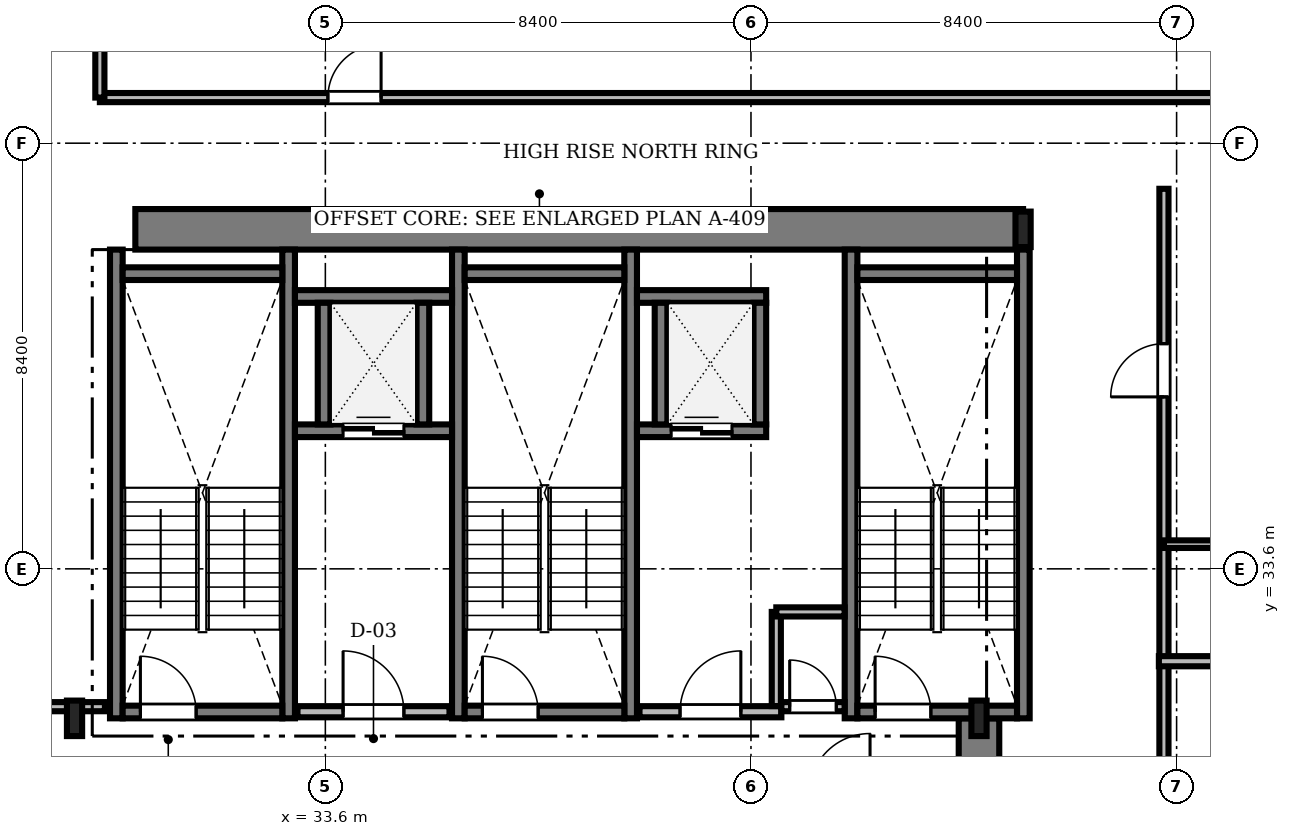
"""IFC4 building model, lengths in metres.
Left out: names, types, materials, properties, quantities, classifications, styles, units other than length and angle.
Written with IfcOpenShell. Run it as: python <this file> out.ifc"""

import sys

from ifc_helpers import new_model, si_unit, direction, frame, frame_2d, origin, origin_2d, place, context, subcontext, project, spatial, rectangle, i_section, extrude, source, transform, mapped, element, fill, save


model = new_model("IFC4")
c1 = context("Model", 3, precision=1e-05, world=origin(), true_north=direction((0.0, 1.0)))
c2 = subcontext(c1, "Body", "Model", "MODEL_VIEW")
j1 = project(units=[si_unit("LENGTHUNIT", "METRE"), si_unit("PLANEANGLEUNIT", "RADIAN")], contexts=[c1])
p1 = place(None, origin())
s1 = spatial("IfcSite", under=j1, at=p1, CompositionType="ELEMENT")
p2 = place(p1, origin())
s2 = spatial("IfcBuilding", under=s1, at=p2, CompositionType="ELEMENT")
p3 = place(p2, frame((0.0, 0.0, 218.55)))
s3 = spatial("IfcBuildingStorey", under=s2, at=p3, CompositionType="ELEMENT", Elevation=218.55)
m1 = source(origin(), c2, "Body", "SweptSolid", [
    extrude(rectangle(XDim=17.52, YDim=0.8, at=frame_2d((8.76, 0.0))), origin(), (0.0, 0.0, 1.0), 3.53),
])
p4 = place(p3, frame((29.85, 40.3, 0.0), z_axis=(0.0, 0.0, 1.0), x_axis=(1.0, 0.0, 0.0)))
e1 = element("IfcWall", 1, at=p4, inside=s3, PredefinedType="SHEAR", context=c2, shape_type="MappedRepresentation", body=[
    mapped(m1, transform((0.0, 0.0, 0.0), scale=1.0)),
])
m2 = source(origin(), c2, "Body", "SweptSolid", [
    extrude(rectangle(XDim=13.15, YDim=0.8, at=frame_2d((6.575, 0.0))), origin(), (0.0, 0.0, 1.0), 3.53),
])
p5 = place(p3, frame((46.5, 17.5, 0.0), z_axis=(0.0, 0.0, 1.0), x_axis=(0.0, 1.0, 0.0)))
e2 = element("IfcWall", 2, at=p5, inside=s3, PredefinedType="SHEAR", context=c2, shape_type="MappedRepresentation", body=[
    mapped(m2, transform((0.0, 0.0, 0.0), scale=1.0)),
])
m3 = source(origin(), c2, "Body", "SweptSolid", [
    extrude(i_section(OverallWidth=0.3, OverallDepth=0.7, WebThickness=0.017, FlangeThickness=0.032, FilletRadius=0.027, at=origin_2d()), origin(), (0.0, 0.0, 1.0), 3.53),
])
for number, where, z_axis, x_axis in (
    (3, (28.65, 30.65, 0.0), (0.0, 0.0, 1.0), (1.0, 0.0, 0.0)),
    (4, (46.5, 30.65, 0.0), (0.0, 0.0, 1.0), (1.0, 0.0, 0.0)),
    (5, (47.37, 40.3, 0.0), (0.0, 0.0, 1.0), (1.0, 0.0, 0.0)),
):
    element("IfcColumn", number, at=place(p3, frame(where, z_axis=z_axis, x_axis=x_axis)), inside=s3, PredefinedType="COLUMN", context=c2, shape_type="MappedRepresentation", body=[
        mapped(m3, transform((0.0, 0.0, 0.0), scale=1.0)),
    ])
m4 = source(origin(), c2, "Body", "SweptSolid", [
    extrude(rectangle(XDim=9.25, YDim=0.25, at=frame_2d((4.625, 0.0))), origin(), (0.0, 0.0, 1.0), 3.55),
])
for number, where, z_axis, x_axis in (
    (6, (29.475, 30.65, 0.0), (0.0, 0.0, 1.0), (0.0, 1.0, 0.0)),
    (7, (32.875, 30.65, 0.0), (0.0, 0.0, 1.0), (0.0, 1.0, 0.0)),
):
    element("IfcWall", number, at=place(p3, frame(where, z_axis=z_axis, x_axis=x_axis)), inside=s3, PredefinedType="SOLIDWALL", context=c2, shape_type="MappedRepresentation", body=[
        mapped(m4, transform((0.0, 0.0, 0.0), scale=1.0)),
    ])
m5 = source(origin(), c2, "Body", "SweptSolid", [
    extrude(rectangle(XDim=3.15, YDim=0.25, at=frame_2d((1.575, 0.0))), origin(), (0.0, 0.0, 1.0), 3.55),
])
p6 = place(p3, frame((29.6, 39.425, 0.0), z_axis=(0.0, 0.0, 1.0), x_axis=(1.0, 0.0, 0.0)))
e8 = element("IfcWall", 8, at=p6, inside=s3, PredefinedType="SOLIDWALL", context=c2, shape_type="MappedRepresentation", body=[
    mapped(m5, transform((0.0, 0.0, 0.0), scale=1.0)),
])
p7 = place(p3, frame((29.6, 30.775, 0.0), z_axis=(0.0, 0.0, 1.0), x_axis=(1.0, 0.0, 0.0)))
e9 = element("IfcWall", 9, at=p7, inside=s3, PredefinedType="SOLIDWALL", context=c2, shape_type="MappedRepresentation", body=[
    mapped(m5, transform((0.0, 0.0, 0.0), scale=1.0)),
])
m6 = source(origin(), c2, "Body", "SweptSolid", [
    extrude(rectangle(XDim=1.1, YDim=2.2, at=frame_2d((0.55, 1.1))), frame((0.0, 0.135, 0.0), z_axis=(0.0, -1.0, 0.0), x_axis=(1.0, 0.0, 0.0)), (0.0, 0.0, 1.0), 0.27),
])
p8 = place(p7, frame((0.35, 0.0, 0.0)))
e10 = element("IfcOpeningElement", 10, at=p8, cuts=e9, PredefinedType="OPENING", context=c2, shape_type="MappedRepresentation", body=[
    mapped(m6, transform((0.0, 0.0, 0.0), scale=1.0)),
])
for number, where, z_axis, x_axis in (
    (11, (36.225, 30.65, 0.0), (0.0, 0.0, 1.0), (0.0, 1.0, 0.0)),
    (12, (39.625, 30.65, 0.0), (0.0, 0.0, 1.0), (0.0, 1.0, 0.0)),
):
    element("IfcWall", number, at=place(p3, frame(where, z_axis=z_axis, x_axis=x_axis)), inside=s3, PredefinedType="SOLIDWALL", context=c2, shape_type="MappedRepresentation", body=[
        mapped(m4, transform((0.0, 0.0, 0.0), scale=1.0)),
    ])
p9 = place(p3, frame((36.35, 39.425, 0.0), z_axis=(0.0, 0.0, 1.0), x_axis=(1.0, 0.0, 0.0)))
e13 = element("IfcWall", 13, at=p9, inside=s3, PredefinedType="SOLIDWALL", context=c2, shape_type="MappedRepresentation", body=[
    mapped(m5, transform((0.0, 0.0, 0.0), scale=1.0)),
])
p10 = place(p3, frame((36.35, 30.775, 0.0), z_axis=(0.0, 0.0, 1.0), x_axis=(1.0, 0.0, 0.0)))
e14 = element("IfcWall", 14, at=p10, inside=s3, PredefinedType="SOLIDWALL", context=c2, shape_type="MappedRepresentation", body=[
    mapped(m5, transform((0.0, 0.0, 0.0), scale=1.0)),
])
p11 = place(p10, frame((0.35, 0.0, 0.0)))
e15 = element("IfcOpeningElement", 15, at=p11, cuts=e14, PredefinedType="OPENING", context=c2, shape_type="MappedRepresentation", body=[
    mapped(m6, transform((0.0, 0.0, 0.0), scale=1.0)),
])
for number, where, z_axis, x_axis in (
    (16, (43.975, 30.65, 0.0), (0.0, 0.0, 1.0), (0.0, 1.0, 0.0)),
    (17, (47.375, 30.65, 0.0), (0.0, 0.0, 1.0), (0.0, 1.0, 0.0)),
):
    element("IfcWall", number, at=place(p3, frame(where, z_axis=z_axis, x_axis=x_axis)), inside=s3, PredefinedType="SOLIDWALL", context=c2, shape_type="MappedRepresentation", body=[
        mapped(m4, transform((0.0, 0.0, 0.0), scale=1.0)),
    ])
p12 = place(p3, frame((44.1, 39.425, 0.0), z_axis=(0.0, 0.0, 1.0), x_axis=(1.0, 0.0, 0.0)))
e18 = element("IfcWall", 18, at=p12, inside=s3, PredefinedType="SOLIDWALL", context=c2, shape_type="MappedRepresentation", body=[
    mapped(m5, transform((0.0, 0.0, 0.0), scale=1.0)),
])
p13 = place(p3, frame((44.1, 30.775, 0.0), z_axis=(0.0, 0.0, 1.0), x_axis=(1.0, 0.0, 0.0)))
e19 = element("IfcWall", 19, at=p13, inside=s3, PredefinedType="SOLIDWALL", context=c2, shape_type="MappedRepresentation", body=[
    mapped(m5, transform((0.0, 0.0, 0.0), scale=1.0)),
])
p14 = place(p13, frame((0.35, 0.0, 0.0)))
e20 = element("IfcOpeningElement", 20, at=p14, cuts=e19, PredefinedType="OPENING", context=c2, shape_type="MappedRepresentation", body=[
    mapped(m6, transform((0.0, 0.0, 0.0), scale=1.0)),
])
m7 = source(origin(), c2, "Body", "SweptSolid", [
    extrude(rectangle(XDim=3.0, YDim=0.22, at=frame_2d((1.5, 0.0))), origin(), (0.0, 0.0, 1.0), 3.53),
])
p15 = place(p3, frame((33.05, 30.78, 0.0), z_axis=(0.0, 0.0, 1.0), x_axis=(1.0, 0.0, 0.0)))
e21 = element("IfcWall", 21, at=p15, inside=s3, PredefinedType="SOLIDWALL", context=c2, shape_type="MappedRepresentation", body=[
    mapped(m7, transform((0.0, 0.0, 0.0), scale=1.0)),
])
m8 = source(origin(), c2, "Body", "SweptSolid", [
    extrude(rectangle(XDim=1.2, YDim=2.2, at=frame_2d((0.6, 1.1))), frame((0.0, 0.12, 0.0), z_axis=(0.0, -1.0, 0.0), x_axis=(1.0, 0.0, 0.0)), (0.0, 0.0, 1.0), 0.24),
])
p16 = place(p15, frame((0.9, 0.0, 0.0)))
e22 = element("IfcOpeningElement", 22, at=p16, cuts=e21, PredefinedType="OPENING", context=c2, shape_type="MappedRepresentation", body=[
    mapped(m8, transform((0.0, 0.0, 0.0), scale=1.0)),
])
m9 = source(origin(), c2, "Body", "SweptSolid", [
    extrude(rectangle(XDim=2.8, YDim=0.22, at=frame_2d((1.4, 0.0))), origin(), (0.0, 0.0, 1.0), 3.53),
])
p17 = place(p3, frame((39.8, 30.78, 0.0), z_axis=(0.0, 0.0, 1.0), x_axis=(1.0, 0.0, 0.0)))
e23 = element("IfcWall", 23, at=p17, inside=s3, PredefinedType="SOLIDWALL", context=c2, shape_type="MappedRepresentation", body=[
    mapped(m9, transform((0.0, 0.0, 0.0), scale=1.0)),
])
p18 = place(p17, frame((0.8, 0.0, 0.0)))
e24 = element("IfcOpeningElement", 24, at=p18, cuts=e23, PredefinedType="OPENING", context=c2, shape_type="MappedRepresentation", body=[
    mapped(m8, transform((0.0, 0.0, 0.0), scale=1.0)),
])
m10 = source(origin(), c2, "Body", "SweptSolid", [
    extrude(rectangle(XDim=3.1, YDim=0.25, at=frame_2d((1.55, 0.0))), origin(), (0.0, 0.0, 1.0), 3.53),
])
p19 = place(p3, frame((33.0, 36.325, 0.0), z_axis=(0.0, 0.0, 1.0), x_axis=(1.0, 0.0, 0.0)))
e25 = element("IfcWall", 25, at=p19, inside=s3, PredefinedType="SOLIDWALL", context=c2, shape_type="MappedRepresentation", body=[
    mapped(m10, transform((0.0, 0.0, 0.0), scale=1.0)),
])
m11 = source(origin(), c2, "Body", "SweptSolid", [
    extrude(rectangle(XDim=1.2, YDim=2.25, at=frame_2d((0.6, 1.125))), frame((0.0, 0.135, 0.0), z_axis=(0.0, -1.0, 0.0), x_axis=(1.0, 0.0, 0.0)), (0.0, 0.0, 1.0), 0.27),
])
p20 = place(p19, frame((0.95, 0.0, 0.0)))
e26 = element("IfcOpeningElement", 26, at=p20, cuts=e25, PredefinedType="OPENING", context=c2, shape_type="MappedRepresentation", body=[
    mapped(m11, transform((0.0, 0.0, 0.0), scale=1.0)),
])
p21 = place(p3, frame((33.0, 38.975, 0.0), z_axis=(0.0, 0.0, 1.0), x_axis=(1.0, 0.0, 0.0)))
e27 = element("IfcWall", 27, at=p21, inside=s3, PredefinedType="SOLIDWALL", context=c2, shape_type="MappedRepresentation", body=[
    mapped(m10, transform((0.0, 0.0, 0.0), scale=1.0)),
])
m12 = source(origin(), c2, "Body", "SweptSolid", [
    extrude(rectangle(XDim=2.4, YDim=0.25, at=frame_2d((1.2, 0.0))), origin(), (0.0, 0.0, 1.0), 3.53),
])
for number, where, z_axis, x_axis in (
    (28, (33.575, 36.45, 0.0), (0.0, 0.0, 1.0), (0.0, 1.0, 0.0)),
    (29, (35.525, 36.45, 0.0), (0.0, 0.0, 1.0), (0.0, 1.0, 0.0)),
):
    element("IfcWall", number, at=place(p3, frame(where, z_axis=z_axis, x_axis=x_axis)), inside=s3, PredefinedType="SOLIDWALL", context=c2, shape_type="MappedRepresentation", body=[
        mapped(m12, transform((0.0, 0.0, 0.0), scale=1.0)),
    ])
m13 = source(origin(), c2, "Body", "SweptSolid", [
    extrude(rectangle(XDim=2.55, YDim=0.25, at=frame_2d((1.275, 0.0))), origin(), (0.0, 0.0, 1.0), 3.53),
])
p22 = place(p3, frame((39.75, 36.325, 0.0), z_axis=(0.0, 0.0, 1.0), x_axis=(1.0, 0.0, 0.0)))
e30 = element("IfcWall", 30, at=p22, inside=s3, PredefinedType="SOLIDWALL", context=c2, shape_type="MappedRepresentation", body=[
    mapped(m13, transform((0.0, 0.0, 0.0), scale=1.0)),
])
p23 = place(p22, frame((0.675, 0.0, 0.0)))
e31 = element("IfcOpeningElement", 31, at=p23, cuts=e30, PredefinedType="OPENING", context=c2, shape_type="MappedRepresentation", body=[
    mapped(m11, transform((0.0, 0.0, 0.0), scale=1.0)),
])
p24 = place(p3, frame((39.75, 38.975, 0.0), z_axis=(0.0, 0.0, 1.0), x_axis=(1.0, 0.0, 0.0)))
e32 = element("IfcWall", 32, at=p24, inside=s3, PredefinedType="SOLIDWALL", context=c2, shape_type="MappedRepresentation", body=[
    mapped(m13, transform((0.0, 0.0, 0.0), scale=1.0)),
])
for number, where, z_axis, x_axis in (
    (33, (40.225, 36.45, 0.0), (0.0, 0.0, 1.0), (0.0, 1.0, 0.0)),
    (34, (42.175, 36.45, 0.0), (0.0, 0.0, 1.0), (0.0, 1.0, 0.0)),
):
    element("IfcWall", number, at=place(p3, frame(where, z_axis=z_axis, x_axis=x_axis)), inside=s3, PredefinedType="SOLIDWALL", context=c2, shape_type="MappedRepresentation", body=[
        mapped(m12, transform((0.0, 0.0, 0.0), scale=1.0)),
    ])
m14 = source(origin(), c2, "Body", "SweptSolid", [
    extrude(rectangle(XDim=28.428, YDim=0.18, at=frame_2d((14.214, 0.0))), origin(), (0.0, 0.0, 1.0), 2.772),
])
p25 = place(p3, frame((29.15, 42.9, 0.0), z_axis=(0.0, 0.0, 1.0), x_axis=(1.0, 0.0, 0.0)))
e35 = element("IfcWall", 35, at=p25, inside=s3, PredefinedType="PARTITIONING", context=c2, shape_type="MappedRepresentation", body=[
    mapped(m14, transform((0.0, 0.0, 0.0), scale=1.0)),
])
m15 = source(origin(), c2, "Body", "SweptSolid", [
    extrude(rectangle(XDim=1.05, YDim=2.2, at=frame_2d((0.525, 1.1))), frame((0.0, 0.1, 0.0), z_axis=(0.0, -1.0, 0.0), x_axis=(1.0, 0.0, 0.0)), (0.0, 0.0, 1.0), 0.2),
])
p26 = place(p25, frame((4.5, 0.0, 0.0)))
e36 = element("IfcOpeningElement", 36, at=p26, cuts=e35, PredefinedType="OPENING", context=c2, shape_type="MappedRepresentation", body=[
    mapped(m15, transform((0.0, 0.0, 0.0), scale=1.0)),
])
m16 = source(origin(), c2, "Body", "SweptSolid", [
    extrude(rectangle(XDim=27.53, YDim=0.18, at=frame_2d((13.765, 0.0))), origin(), (0.0, 0.0, 1.0), 2.972),
])
p27 = place(p3, frame((50.15, 13.57, 0.0), z_axis=(0.0, 0.0, 1.0), x_axis=(0.0, 1.0, 0.0)))
e37 = element("IfcWall", 37, at=p27, inside=s3, PredefinedType="PARTITIONING", context=c2, shape_type="MappedRepresentation", body=[
    mapped(m16, transform((0.0, 0.0, 0.0), scale=1.0)),
])
p28 = place(p27, frame((5.217, 0.0, 0.0)))
e38 = element("IfcOpeningElement", 38, at=p28, cuts=e37, PredefinedType="OPENING", context=c2, shape_type="MappedRepresentation", body=[
    mapped(m15, transform((0.0, 0.0, 0.0), scale=1.0)),
])
p29 = place(p27, frame((14.32, 0.0, 0.0)))
e39 = element("IfcOpeningElement", 39, at=p29, cuts=e37, PredefinedType="OPENING", context=c2, shape_type="MappedRepresentation", body=[
    mapped(m15, transform((0.0, 0.0, 0.0), scale=1.0)),
])
p30 = place(p27, frame((23.423, 0.0, 0.0)))
e40 = element("IfcOpeningElement", 40, at=p30, cuts=e37, PredefinedType="OPENING", context=c2, shape_type="MappedRepresentation", body=[
    mapped(m15, transform((0.0, 0.0, 0.0), scale=1.0)),
])
m17 = source(origin(), c2, "Body", "SweptSolid", [
    extrude(rectangle(XDim=17.828, YDim=0.18, at=frame_2d((8.914, 0.0))), origin(), (0.0, 0.0, 1.0), 2.772),
])
p31 = place(p3, frame((11.422, 30.88, 0.0), z_axis=(0.0, 0.0, 1.0), x_axis=(1.0, 0.0, 0.0)))
e41 = element("IfcWall", 41, at=p31, inside=s3, PredefinedType="PARTITIONING", context=c2, shape_type="MappedRepresentation", body=[
    mapped(m17, transform((0.0, 0.0, 0.0), scale=1.0)),
])
p32 = place(p31, frame((10.778, 0.0, 0.0)))
e42 = element("IfcOpeningElement", 42, at=p32, cuts=e41, PredefinedType="OPENING", context=c2, shape_type="MappedRepresentation", body=[
    mapped(m15, transform((0.0, 0.0, 0.0), scale=1.0)),
])
m18 = source(origin(), c2, "Body", "SweptSolid", [
    extrude(rectangle(XDim=1.248, YDim=0.18, at=frame_2d((0.624, 0.0))), origin(), (0.0, 0.0, 1.0), 3.53),
])
p33 = place(p3, frame((42.6, 30.88, 0.0), z_axis=(0.0, 0.0, 1.0), x_axis=(1.0, 0.0, 0.0)))
e43 = element("IfcWall", 43, at=p33, inside=s3, PredefinedType="PARTITIONING", context=c2, shape_type="MappedRepresentation", body=[
    mapped(m18, transform((0.0, 0.0, 0.0), scale=1.0)),
])
m19 = source(origin(), c2, "Body", "SweptSolid", [
    extrude(rectangle(XDim=0.92, YDim=2.1, at=frame_2d((0.46, 1.05))), frame((0.0, 0.1, 0.0), z_axis=(0.0, -1.0, 0.0), x_axis=(1.0, 0.0, 0.0)), (0.0, 0.0, 1.0), 0.2),
])
p34 = place(p33, frame((0.164, 0.0, 0.0)))
e44 = element("IfcOpeningElement", 44, at=p34, cuts=e43, PredefinedType="OPENING", context=c2, shape_type="MappedRepresentation", body=[
    mapped(m19, transform((0.0, 0.0, 0.0), scale=1.0)),
])
m20 = source(origin(), c2, "Body", "SweptSolid", [
    extrude(rectangle(XDim=7.528, YDim=0.2, at=frame_2d((3.764, 0.0))), origin(), (0.0, 0.0, 1.0), 2.772),
])
p35 = place(p3, frame((50.05, 31.777, 0.0), z_axis=(0.0, 0.0, 1.0), x_axis=(1.0, 0.0, 0.0)))
e45 = element("IfcWall", 45, at=p35, inside=s3, PredefinedType="PARTITIONING", context=c2, shape_type="MappedRepresentation", body=[
    mapped(m20, transform((0.0, 0.0, 0.0), scale=1.0)),
])
m21 = source(origin(), c2, "Body", "SweptSolid", [
    extrude(rectangle(XDim=5.378, YDim=0.18, at=frame_2d((2.689, 0.0))), origin(), (0.0, 0.0, 1.0), 2.772),
])
p36 = place(p3, frame((29.15, 42.9, 0.0), z_axis=(0.0, 0.0, 1.0), x_axis=(0.0, 1.0, 0.0)))
e46 = element("IfcWall", 46, at=p36, inside=s3, PredefinedType="PARTITIONING", context=c2, shape_type="MappedRepresentation", body=[
    mapped(m21, transform((0.0, 0.0, 0.0), scale=1.0)),
])
m22 = source(origin(), c2, "Body", "SweptSolid", [
    extrude(rectangle(XDim=2.36, YDim=0.15, at=frame_2d((1.18, 0.0))), origin(), (0.0, 0.0, 1.0), 3.53),
])
p37 = place(p3, frame((50.15, 34.087, 0.0), z_axis=(0.0, 0.0, 1.0), x_axis=(1.0, 0.0, 0.0)))
e47 = element("IfcWall", 47, at=p37, inside=s3, PredefinedType="PARTITIONING", context=c2, shape_type="MappedRepresentation", body=[
    mapped(m22, transform((0.0, 0.0, 0.0), scale=1.0)),
])
m23 = source(origin(), c2, "Body", "SweptSolid", [
    extrude(rectangle(XDim=1.858, YDim=0.18, at=frame_2d((0.929, 0.0))), origin(), (0.0, 0.0, 1.0), 3.53),
])
p38 = place(p3, frame((42.5, 30.892, 0.0), z_axis=(0.0, 0.0, 1.0), x_axis=(0.0, 1.0, 0.0)))
e48 = element("IfcWall", 48, at=p38, inside=s3, PredefinedType="PARTITIONING", context=c2, shape_type="MappedRepresentation", body=[
    mapped(m23, transform((0.0, 0.0, 0.0), scale=1.0)),
])
m24 = source(origin(), c2, "Body", "SweptSolid", [
    extrude(rectangle(XDim=1.348, YDim=0.18, at=frame_2d((0.674, 0.0))), origin(), (0.0, 0.0, 1.0), 3.53),
])
p39 = place(p3, frame((42.5, 32.75, 0.0), z_axis=(0.0, 0.0, 1.0), x_axis=(1.0, 0.0, 0.0)))
e49 = element("IfcWall", 49, at=p39, inside=s3, PredefinedType="PARTITIONING", context=c2, shape_type="MappedRepresentation", body=[
    mapped(m24, transform((0.0, 0.0, 0.0), scale=1.0)),
])
m25 = source(origin(), c2, "Body", "SweptSolid", [
    extrude(rectangle(XDim=1.1, YDim=2.2, at=frame_2d((0.55, 1.1))), frame((0.0, 0.025, 0.0), z_axis=(0.0, -1.0, 0.0), x_axis=(1.0, 0.0, 0.0)), (0.0, 0.0, 1.0), 0.05),
])
p40 = place(p8, origin())
e50 = element("IfcDoor", 50, at=p40, inside=s3, OperationType="SINGLE_SWING_LEFT", PredefinedType="DOOR", context=c2, shape_type="MappedRepresentation", body=[
    mapped(m25, transform((0.0, 0.0, 0.0), scale=1.0)),
])
fill(e10, e50)
p41 = place(p11, origin())
e51 = element("IfcDoor", 51, at=p41, inside=s3, OperationType="SINGLE_SWING_LEFT", PredefinedType="DOOR", context=c2, shape_type="MappedRepresentation", body=[
    mapped(m25, transform((0.0, 0.0, 0.0), scale=1.0)),
])
fill(e15, e51)
p42 = place(p14, origin())
e52 = element("IfcDoor", 52, at=p42, inside=s3, OperationType="SINGLE_SWING_LEFT", PredefinedType="DOOR", context=c2, shape_type="MappedRepresentation", body=[
    mapped(m25, transform((0.0, 0.0, 0.0), scale=1.0)),
])
fill(e20, e52)
m26 = source(origin(), c2, "Body", "SweptSolid", [
    extrude(rectangle(XDim=1.2, YDim=2.2, at=frame_2d((0.6, 1.1))), frame((0.0, 0.025, 0.0), z_axis=(0.0, -1.0, 0.0), x_axis=(1.0, 0.0, 0.0)), (0.0, 0.0, 1.0), 0.05),
])
p43 = place(p16, origin())
e53 = element("IfcDoor", 53, at=p43, inside=s3, OperationType="SINGLE_SWING_LEFT", PredefinedType="DOOR", context=c2, shape_type="MappedRepresentation", body=[
    mapped(m26, transform((0.0, 0.0, 0.0), scale=1.0)),
])
fill(e22, e53)
p44 = place(p18, origin())
e54 = element("IfcDoor", 54, at=p44, inside=s3, OperationType="SINGLE_SWING_RIGHT", PredefinedType="DOOR", context=c2, shape_type="MappedRepresentation", body=[
    mapped(m26, transform((0.0, 0.0, 0.0), scale=1.0)),
])
fill(e24, e54)
m27 = source(origin(), c2, "Body", "SweptSolid", [
    extrude(rectangle(XDim=1.2, YDim=2.25, at=frame_2d((0.6, 1.125))), frame((0.0, 0.025, 0.0), z_axis=(0.0, -1.0, 0.0), x_axis=(1.0, 0.0, 0.0)), (0.0, 0.0, 1.0), 0.05),
])
p45 = place(p20, origin())
e55 = element("IfcDoor", 55, at=p45, inside=s3, OperationType="DOUBLE_DOOR_SLIDING", PredefinedType="DOOR", context=c2, shape_type="MappedRepresentation", body=[
    mapped(m27, transform((0.0, 0.0, 0.0), scale=1.0)),
])
fill(e26, e55)
p46 = place(p23, origin())
e56 = element("IfcDoor", 56, at=p46, inside=s3, OperationType="DOUBLE_DOOR_SLIDING", PredefinedType="DOOR", context=c2, shape_type="MappedRepresentation", body=[
    mapped(m27, transform((0.0, 0.0, 0.0), scale=1.0)),
])
fill(e31, e56)
m28 = source(origin(), c2, "Body", "SweptSolid", [
    extrude(rectangle(XDim=1.05, YDim=2.2, at=frame_2d((0.525, 1.1))), frame((0.0, 0.025, 0.0), z_axis=(0.0, -1.0, 0.0), x_axis=(1.0, 0.0, 0.0)), (0.0, 0.0, 1.0), 0.05),
])
p47 = place(p26, origin())
e57 = element("IfcDoor", 57, at=p47, inside=s3, OperationType="SINGLE_SWING_RIGHT", PredefinedType="DOOR", context=c2, shape_type="MappedRepresentation", body=[
    mapped(m28, transform((0.0, 0.0, 0.0), scale=1.0)),
])
fill(e36, e57)
p48 = place(p30, origin())
e58 = element("IfcDoor", 58, at=p48, inside=s3, OperationType="SINGLE_SWING_LEFT", PredefinedType="DOOR", context=c2, shape_type="MappedRepresentation", body=[
    mapped(m28, transform((0.0, 0.0, 0.0), scale=1.0)),
])
fill(e40, e58)
m29 = source(origin(), c2, "Body", "SweptSolid", [
    extrude(rectangle(XDim=0.92, YDim=2.1, at=frame_2d((0.46, 1.05))), frame((0.0, 0.025, 0.0), z_axis=(0.0, -1.0, 0.0), x_axis=(1.0, 0.0, 0.0)), (0.0, 0.0, 1.0), 0.05),
])
p49 = place(p34, origin())
e59 = element("IfcDoor", 59, at=p49, inside=s3, OperationType="SINGLE_SWING_LEFT", PredefinedType="DOOR", context=c2, shape_type="MappedRepresentation", body=[
    mapped(m29, transform((0.0, 0.0, 0.0), scale=1.0)),
])
fill(e44, e59)
save(model, sys.argv[1])
